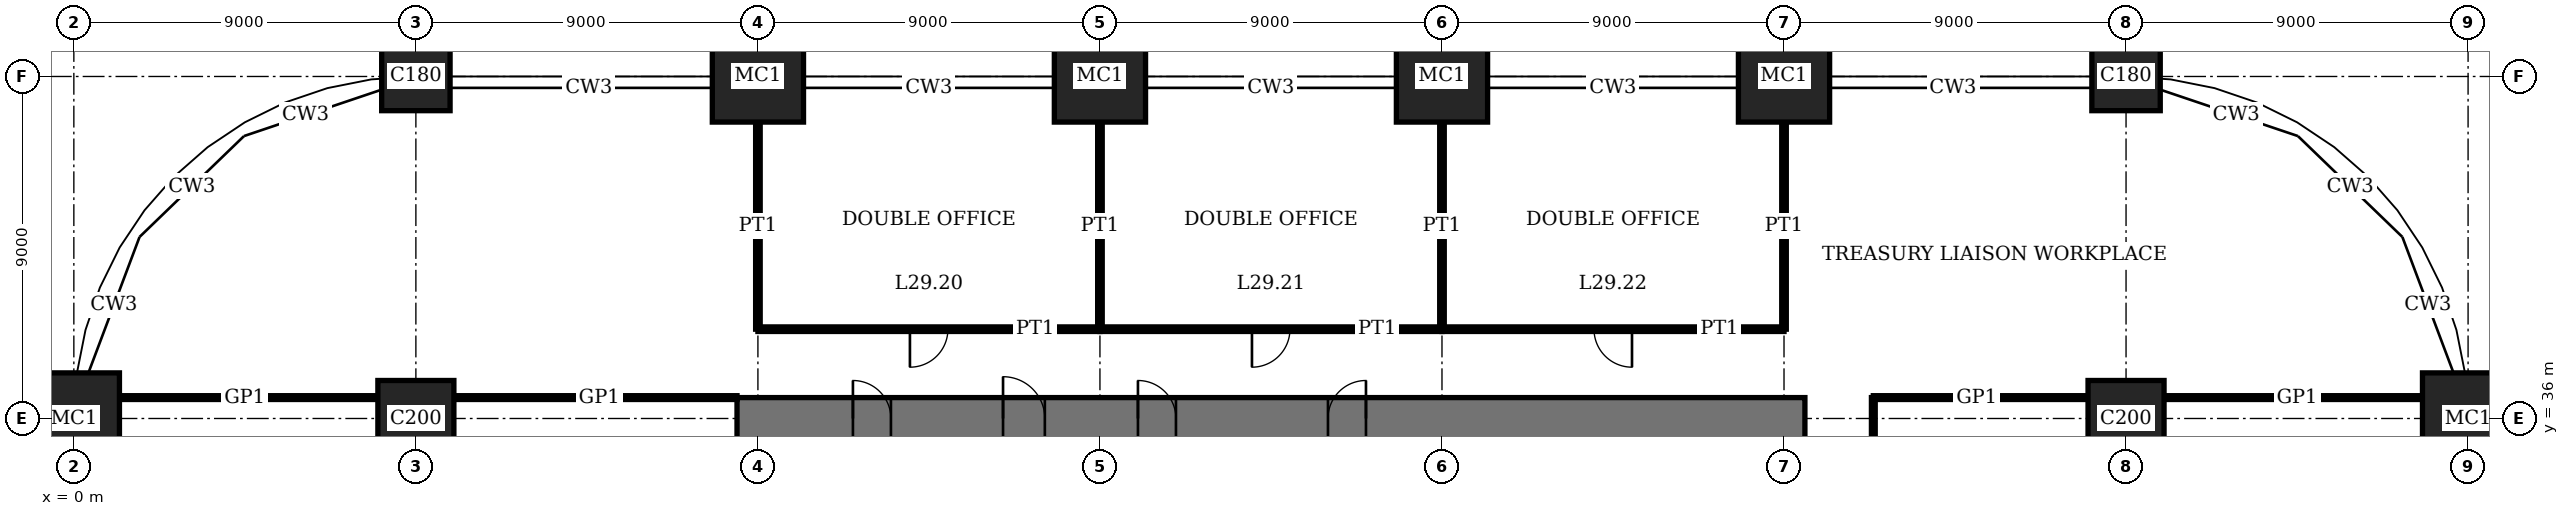
"""IFC4 building model, lengths in metres.
Left out: names, types, materials, properties, quantities, classifications, styles, units other than length and angle.
Written with IfcOpenShell. Run it as: python <this file> out.ifc"""

import sys

from ifc_helpers import new_model, si_unit, direction, frame, frame_2d, origin, origin_2d, place, context, subcontext, project, spatial, rectangle, extrude, element, fill, save


model = new_model("IFC4")
c1 = context("Model", 3, precision=1e-05, world=origin(), true_north=direction((0.0, 1.0)))
c2 = subcontext(c1, "Body", "Model", "MODEL_VIEW")
j1 = project(units=[si_unit("LENGTHUNIT", "METRE"), si_unit("PLANEANGLEUNIT", "RADIAN")], contexts=[c1])
p1 = place(None, origin())
s1 = spatial("IfcSite", under=j1, at=p1, CompositionType="ELEMENT")
p2 = place(p1, origin())
s2 = spatial("IfcBuilding", under=s1, at=p2, CompositionType="ELEMENT")
p3 = place(p2, frame((0.0, 0.0, 121.0)))
s3 = spatial("IfcBuildingStorey", under=s2, at=p3, CompositionType="ELEMENT", Elevation=121.0)
p4 = place(p3, frame((0.0, 36.0, 0.0), z_axis=(0.0, 0.0, 1.0), x_axis=(1.0, 0.0, 0.0)))
e1 = element("IfcColumn", 1, at=p4, inside=s3, PredefinedType="COLUMN", context=c2, shape_type="SweptSolid", body=[
    extrude(rectangle(XDim=2.4, YDim=2.4, at=origin_2d()), origin(), (0.0, 0.0, 1.0), 4.0),
])
p5 = place(p3, frame((9.0, 36.0, 0.0), z_axis=(0.0, 0.0, 1.0), x_axis=(1.0, 0.0, 0.0)))
e2 = element("IfcColumn", 2, at=p5, inside=s3, PredefinedType="COLUMN", context=c2, shape_type="SweptSolid", body=[
    extrude(rectangle(XDim=2.0, YDim=2.0, at=origin_2d()), origin(), (0.0, 0.0, 1.0), 4.0),
])
p6 = place(p3, frame((9.0, 45.0, 0.0), z_axis=(0.0, 0.0, 1.0), x_axis=(1.0, 0.0, 0.0)))
e3 = element("IfcColumn", 3, at=p6, inside=s3, PredefinedType="COLUMN", context=c2, shape_type="SweptSolid", body=[
    extrude(rectangle(XDim=1.8, YDim=1.8, at=origin_2d()), origin(), (0.0, 0.0, 1.0), 4.0),
])
for number, where, z_axis, x_axis in (
    (4, (18.0, 45.0, 0.0), (0.0, 0.0, 1.0), (1.0, 0.0, 0.0)),
    (5, (27.0, 45.0, 0.0), (0.0, 0.0, 1.0), (1.0, 0.0, 0.0)),
    (6, (36.0, 45.0, 0.0), (0.0, 0.0, 1.0), (1.0, 0.0, 0.0)),
    (7, (45.0, 45.0, 0.0), (0.0, 0.0, 1.0), (1.0, 0.0, 0.0)),
):
    element("IfcColumn", number, at=place(p3, frame(where, z_axis=z_axis, x_axis=x_axis)), inside=s3, PredefinedType="COLUMN", context=c2, shape_type="SweptSolid", body=[
        extrude(rectangle(XDim=2.4, YDim=2.4, at=origin_2d()), origin(), (0.0, 0.0, 1.0), 4.0),
    ])
p7 = place(p3, frame((54.0, 36.0, 0.0), z_axis=(0.0, 0.0, 1.0), x_axis=(1.0, 0.0, 0.0)))
e8 = element("IfcColumn", 8, at=p7, inside=s3, PredefinedType="COLUMN", context=c2, shape_type="SweptSolid", body=[
    extrude(rectangle(XDim=2.0, YDim=2.0, at=origin_2d()), origin(), (0.0, 0.0, 1.0), 4.0),
])
p8 = place(p3, frame((54.0, 45.0, 0.0), z_axis=(0.0, 0.0, 1.0), x_axis=(1.0, 0.0, 0.0)))
e9 = element("IfcColumn", 9, at=p8, inside=s3, PredefinedType="COLUMN", context=c2, shape_type="SweptSolid", body=[
    extrude(rectangle(XDim=1.8, YDim=1.8, at=origin_2d()), origin(), (0.0, 0.0, 1.0), 4.0),
])
p9 = place(p3, frame((63.0, 36.0, 0.0), z_axis=(0.0, 0.0, 1.0), x_axis=(1.0, 0.0, 0.0)))
e10 = element("IfcColumn", 10, at=p9, inside=s3, PredefinedType="COLUMN", context=c2, shape_type="SweptSolid", body=[
    extrude(rectangle(XDim=2.4, YDim=2.4, at=origin_2d()), origin(), (0.0, 0.0, 1.0), 4.0),
])
p10 = place(p3, frame((45.55, 36.0, 0.0), z_axis=(0.0, 0.0, 1.0), x_axis=(-1.0, 0.0, 0.0)))
e11 = element("IfcWall", 11, at=p10, inside=s3, PredefinedType="SHEAR", context=c2, shape_type="SweptSolid", body=[
    extrude(rectangle(XDim=28.1, YDim=1.1, at=frame_2d((14.05, 0.0))), origin(), (0.0, 0.0, 1.0), 4.0),
])
p11 = place(p10, frame((11.55, 0.0, 0.0)))
e12 = element("IfcOpeningElement", 12, at=p11, cuts=e11, PredefinedType="OPENING", context=c2, shape_type="SweptSolid", body=[
    extrude(rectangle(XDim=1.0, YDim=2.4, at=frame_2d((0.5, 1.2))), frame((0.0, 0.56, 0.0), z_axis=(0.0, -1.0, 0.0), x_axis=(1.0, 0.0, 0.0)), (0.0, 0.0, 1.0), 1.12),
])
p12 = place(p10, frame((16.55, 0.0, 0.0)))
e13 = element("IfcOpeningElement", 13, at=p12, cuts=e11, PredefinedType="OPENING", context=c2, shape_type="SweptSolid", body=[
    extrude(rectangle(XDim=1.0, YDim=2.4, at=frame_2d((0.5, 1.2))), frame((0.0, 0.56, 0.0), z_axis=(0.0, -1.0, 0.0), x_axis=(1.0, 0.0, 0.0)), (0.0, 0.0, 1.0), 1.12),
])
p13 = place(p10, frame((20.0, 0.0, 0.0)))
e14 = element("IfcOpeningElement", 14, at=p13, cuts=e11, PredefinedType="OPENING", context=c2, shape_type="SweptSolid", body=[
    extrude(rectangle(XDim=1.1, YDim=2.4, at=frame_2d((0.55, 1.2))), frame((0.0, 0.56, 0.0), z_axis=(0.0, -1.0, 0.0), x_axis=(1.0, 0.0, 0.0)), (0.0, 0.0, 1.0), 1.12),
])
p14 = place(p10, frame((24.05, 0.0, 0.0)))
e15 = element("IfcOpeningElement", 15, at=p14, cuts=e11, PredefinedType="OPENING", context=c2, shape_type="SweptSolid", body=[
    extrude(rectangle(XDim=1.0, YDim=2.4, at=frame_2d((0.5, 1.2))), frame((0.0, 0.56, 0.0), z_axis=(0.0, -1.0, 0.0), x_axis=(1.0, 0.0, 0.0)), (0.0, 0.0, 1.0), 1.12),
])
p15 = place(p3, frame((1.2, 36.55, 0.0), z_axis=(0.0, 0.0, 1.0), x_axis=(1.0, 0.0, 0.0)))
e16 = element("IfcWall", 16, at=p15, inside=s3, PredefinedType="PARTITIONING", context=c2, shape_type="SweptSolid", body=[
    extrude(rectangle(XDim=6.8, YDim=0.1, at=frame_2d((3.4, 0.0))), origin(), (0.0, 0.0, 1.0), 3.75),
])
p16 = place(p3, frame((10.0, 36.55, 0.0), z_axis=(0.0, 0.0, 1.0), x_axis=(1.0, 0.0, 0.0)))
e17 = element("IfcWall", 17, at=p16, inside=s3, PredefinedType="PARTITIONING", context=c2, shape_type="SweptSolid", body=[
    extrude(rectangle(XDim=7.45, YDim=0.1, at=frame_2d((3.725, 0.0))), origin(), (0.0, 0.0, 1.0), 3.75),
])
p17 = place(p3, frame((47.35, 36.55, 0.0), z_axis=(0.0, 0.0, 1.0), x_axis=(1.0, 0.0, 0.0)))
e18 = element("IfcWall", 18, at=p17, inside=s3, PredefinedType="PARTITIONING", context=c2, shape_type="SweptSolid", body=[
    extrude(rectangle(XDim=5.65, YDim=0.1, at=frame_2d((2.825, 0.0))), origin(), (0.0, 0.0, 1.0), 3.75),
])
p18 = place(p3, frame((55.0, 36.55, 0.0), z_axis=(0.0, 0.0, 1.0), x_axis=(1.0, 0.0, 0.0)))
e19 = element("IfcWall", 19, at=p18, inside=s3, PredefinedType="PARTITIONING", context=c2, shape_type="SweptSolid", body=[
    extrude(rectangle(XDim=6.8, YDim=0.1, at=frame_2d((3.4, 0.0))), origin(), (0.0, 0.0, 1.0), 3.75),
])
p19 = place(p3, frame((18.0, 38.35, 0.0), z_axis=(0.0, 0.0, 1.0), x_axis=(1.0, 0.0, 0.0)))
e20 = element("IfcWall", 20, at=p19, inside=s3, PredefinedType="PARTITIONING", context=c2, shape_type="SweptSolid", body=[
    extrude(rectangle(XDim=9.0, YDim=0.12, at=frame_2d((4.5, 0.0))), origin(), (0.0, 0.0, 1.0), 3.75),
])
p20 = place(p19, frame((4.0, 0.0, 0.0)))
e21 = element("IfcOpeningElement", 21, at=p20, cuts=e20, PredefinedType="OPENING", context=c2, shape_type="SweptSolid", body=[
    extrude(rectangle(XDim=1.0, YDim=2.4, at=frame_2d((0.5, 1.2))), frame((0.0, 0.07, 0.0), z_axis=(0.0, -1.0, 0.0), x_axis=(1.0, 0.0, 0.0)), (0.0, 0.0, 1.0), 0.14),
])
p21 = place(p3, frame((27.0, 38.35, 0.0), z_axis=(0.0, 0.0, 1.0), x_axis=(1.0, 0.0, 0.0)))
e22 = element("IfcWall", 22, at=p21, inside=s3, PredefinedType="PARTITIONING", context=c2, shape_type="SweptSolid", body=[
    extrude(rectangle(XDim=9.0, YDim=0.12, at=frame_2d((4.5, 0.0))), origin(), (0.0, 0.0, 1.0), 3.75),
])
p22 = place(p21, frame((4.0, 0.0, 0.0)))
e23 = element("IfcOpeningElement", 23, at=p22, cuts=e22, PredefinedType="OPENING", context=c2, shape_type="SweptSolid", body=[
    extrude(rectangle(XDim=1.0, YDim=2.4, at=frame_2d((0.5, 1.2))), frame((0.0, 0.07, 0.0), z_axis=(0.0, -1.0, 0.0), x_axis=(1.0, 0.0, 0.0)), (0.0, 0.0, 1.0), 0.14),
])
p23 = place(p3, frame((36.0, 38.35, 0.0), z_axis=(0.0, 0.0, 1.0), x_axis=(1.0, 0.0, 0.0)))
e24 = element("IfcWall", 24, at=p23, inside=s3, PredefinedType="PARTITIONING", context=c2, shape_type="SweptSolid", body=[
    extrude(rectangle(XDim=9.0, YDim=0.12, at=frame_2d((4.5, 0.0))), origin(), (0.0, 0.0, 1.0), 3.75),
])
p24 = place(p23, frame((4.0, 0.0, 0.0)))
e25 = element("IfcOpeningElement", 25, at=p24, cuts=e24, PredefinedType="OPENING", context=c2, shape_type="SweptSolid", body=[
    extrude(rectangle(XDim=1.0, YDim=2.4, at=frame_2d((0.5, 1.2))), frame((0.0, 0.07, 0.0), z_axis=(0.0, -1.0, 0.0), x_axis=(1.0, 0.0, 0.0)), (0.0, 0.0, 1.0), 0.14),
])
for number, where, z_axis, x_axis in (
    (26, (18.0, 38.35, 0.0), (0.0, 0.0, 1.0), (0.0, 1.0, 0.0)),
    (27, (27.0, 38.35, 0.0), (0.0, 0.0, 1.0), (0.0, 1.0, 0.0)),
    (28, (36.0, 38.35, 0.0), (0.0, 0.0, 1.0), (0.0, 1.0, 0.0)),
    (29, (45.0, 38.35, 0.0), (0.0, 0.0, 1.0), (0.0, 1.0, 0.0)),
):
    element("IfcWall", number, at=place(p3, frame(where, z_axis=z_axis, x_axis=x_axis)), inside=s3, PredefinedType="PARTITIONING", context=c2, shape_type="SweptSolid", body=[
        extrude(rectangle(XDim=5.45, YDim=0.12, at=frame_2d((2.725, 0.0))), origin(), (0.0, 0.0, 1.0), 3.05),
    ])
p25 = place(p3, frame((47.35, 27.0, 0.0), z_axis=(0.0, 0.0, 1.0), x_axis=(0.0, 1.0, 0.0)))
e30 = element("IfcWall", 30, at=p25, inside=s3, PredefinedType="PARTITIONING", context=c2, shape_type="SweptSolid", body=[
    extrude(rectangle(XDim=9.55, YDim=0.1, at=frame_2d((4.775, 0.0))), origin(), (0.0, 0.0, 1.0), 3.75),
])
p26 = place(p25, frame((4.275, 0.0, 0.0)))
e31 = element("IfcOpeningElement", 31, at=p26, cuts=e30, PredefinedType="OPENING", context=c2, shape_type="SweptSolid", body=[
    extrude(rectangle(XDim=1.0, YDim=2.4, at=frame_2d((0.5, 1.2))), frame((0.0, 0.06, 0.0), z_axis=(0.0, -1.0, 0.0), x_axis=(1.0, 0.0, 0.0)), (0.0, 0.0, 1.0), 0.12),
])
p27 = place(p11, origin())
e32 = element("IfcDoor", 32, at=p27, inside=s3, OperationType="SINGLE_SWING_LEFT", PredefinedType="DOOR", context=c2, shape_type="SweptSolid", body=[
    extrude(rectangle(XDim=1.0, YDim=2.4, at=frame_2d((0.5, 1.2))), frame((0.0, 0.025, 0.0), z_axis=(0.0, -1.0, 0.0), x_axis=(1.0, 0.0, 0.0)), (0.0, 0.0, 1.0), 0.05),
    extrude(rectangle(XDim=0.04, YDim=2.4, at=frame_2d((0.02, 1.2))), frame((0.0, 0.4, 0.0), z_axis=(0.0, -1.0, 0.0), x_axis=(1.0, 0.0, 0.0)), (0.0, 0.0, 1.0), 0.8),
    extrude(rectangle(XDim=0.04, YDim=2.4, at=frame_2d((0.98, 1.2))), frame((0.0, 0.4, 0.0), z_axis=(0.0, -1.0, 0.0), x_axis=(1.0, 0.0, 0.0)), (0.0, 0.0, 1.0), 0.8),
    extrude(rectangle(XDim=1.0, YDim=0.04, at=frame_2d((0.5, 2.38))), frame((0.0, 0.4, 0.0), z_axis=(0.0, -1.0, 0.0), x_axis=(1.0, 0.0, 0.0)), (0.0, 0.0, 1.0), 0.8),
])
fill(e12, e32)
p28 = place(p12, origin())
e33 = element("IfcDoor", 33, at=p28, inside=s3, OperationType="SINGLE_SWING_RIGHT", PredefinedType="DOOR", context=c2, shape_type="SweptSolid", body=[
    extrude(rectangle(XDim=1.0, YDim=2.4, at=frame_2d((0.5, 1.2))), frame((0.0, 0.025, 0.0), z_axis=(0.0, -1.0, 0.0), x_axis=(1.0, 0.0, 0.0)), (0.0, 0.0, 1.0), 0.05),
    extrude(rectangle(XDim=0.04, YDim=2.4, at=frame_2d((0.02, 1.2))), frame((0.0, 0.4, 0.0), z_axis=(0.0, -1.0, 0.0), x_axis=(1.0, 0.0, 0.0)), (0.0, 0.0, 1.0), 0.8),
    extrude(rectangle(XDim=0.04, YDim=2.4, at=frame_2d((0.98, 1.2))), frame((0.0, 0.4, 0.0), z_axis=(0.0, -1.0, 0.0), x_axis=(1.0, 0.0, 0.0)), (0.0, 0.0, 1.0), 0.8),
    extrude(rectangle(XDim=1.0, YDim=0.04, at=frame_2d((0.5, 2.38))), frame((0.0, 0.4, 0.0), z_axis=(0.0, -1.0, 0.0), x_axis=(1.0, 0.0, 0.0)), (0.0, 0.0, 1.0), 0.8),
])
fill(e13, e33)
p29 = place(p13, origin())
e34 = element("IfcDoor", 34, at=p29, inside=s3, OperationType="SINGLE_SWING_RIGHT", PredefinedType="DOOR", context=c2, shape_type="SweptSolid", body=[
    extrude(rectangle(XDim=1.1, YDim=2.4, at=frame_2d((0.55, 1.2))), frame((0.0, 0.025, 0.0), z_axis=(0.0, -1.0, 0.0), x_axis=(1.0, 0.0, 0.0)), (0.0, 0.0, 1.0), 0.05),
    extrude(rectangle(XDim=0.04, YDim=2.4, at=frame_2d((0.02, 1.2))), frame((0.0, 0.44, 0.0), z_axis=(0.0, -1.0, 0.0), x_axis=(1.0, 0.0, 0.0)), (0.0, 0.0, 1.0), 0.88),
    extrude(rectangle(XDim=0.04, YDim=2.4, at=frame_2d((1.08, 1.2))), frame((0.0, 0.44, 0.0), z_axis=(0.0, -1.0, 0.0), x_axis=(1.0, 0.0, 0.0)), (0.0, 0.0, 1.0), 0.88),
    extrude(rectangle(XDim=1.1, YDim=0.04, at=frame_2d((0.55, 2.38))), frame((0.0, 0.44, 0.0), z_axis=(0.0, -1.0, 0.0), x_axis=(1.0, 0.0, 0.0)), (0.0, 0.0, 1.0), 0.88),
])
fill(e14, e34)
p30 = place(p14, origin())
e35 = element("IfcDoor", 35, at=p30, inside=s3, OperationType="SINGLE_SWING_RIGHT", PredefinedType="DOOR", context=c2, shape_type="SweptSolid", body=[
    extrude(rectangle(XDim=1.0, YDim=2.4, at=frame_2d((0.5, 1.2))), frame((0.0, 0.025, 0.0), z_axis=(0.0, -1.0, 0.0), x_axis=(1.0, 0.0, 0.0)), (0.0, 0.0, 1.0), 0.05),
    extrude(rectangle(XDim=0.04, YDim=2.4, at=frame_2d((0.02, 1.2))), frame((0.0, 0.4, 0.0), z_axis=(0.0, -1.0, 0.0), x_axis=(1.0, 0.0, 0.0)), (0.0, 0.0, 1.0), 0.8),
    extrude(rectangle(XDim=0.04, YDim=2.4, at=frame_2d((0.98, 1.2))), frame((0.0, 0.4, 0.0), z_axis=(0.0, -1.0, 0.0), x_axis=(1.0, 0.0, 0.0)), (0.0, 0.0, 1.0), 0.8),
    extrude(rectangle(XDim=1.0, YDim=0.04, at=frame_2d((0.5, 2.38))), frame((0.0, 0.4, 0.0), z_axis=(0.0, -1.0, 0.0), x_axis=(1.0, 0.0, 0.0)), (0.0, 0.0, 1.0), 0.8),
])
fill(e15, e35)
p31 = place(p20, origin())
e36 = element("IfcDoor", 36, at=p31, inside=s3, OperationType="SINGLE_SWING_LEFT", PredefinedType="DOOR", context=c2, shape_type="SweptSolid", body=[
    extrude(rectangle(XDim=1.0, YDim=2.4, at=frame_2d((0.5, 1.2))), frame((0.0, 0.025, 0.0), z_axis=(0.0, -1.0, 0.0), x_axis=(1.0, 0.0, 0.0)), (0.0, 0.0, 1.0), 0.05),
])
fill(e21, e36)
p32 = place(p22, origin())
e37 = element("IfcDoor", 37, at=p32, inside=s3, OperationType="SINGLE_SWING_LEFT", PredefinedType="DOOR", context=c2, shape_type="SweptSolid", body=[
    extrude(rectangle(XDim=1.0, YDim=2.4, at=frame_2d((0.5, 1.2))), frame((0.0, 0.025, 0.0), z_axis=(0.0, -1.0, 0.0), x_axis=(1.0, 0.0, 0.0)), (0.0, 0.0, 1.0), 0.05),
])
fill(e23, e37)
p33 = place(p24, origin())
e38 = element("IfcDoor", 38, at=p33, inside=s3, OperationType="SINGLE_SWING_RIGHT", PredefinedType="DOOR", context=c2, shape_type="SweptSolid", body=[
    extrude(rectangle(XDim=1.0, YDim=2.4, at=frame_2d((0.5, 1.2))), frame((0.0, 0.025, 0.0), z_axis=(0.0, -1.0, 0.0), x_axis=(1.0, 0.0, 0.0)), (0.0, 0.0, 1.0), 0.05),
])
fill(e25, e38)
save(model, sys.argv[1])
